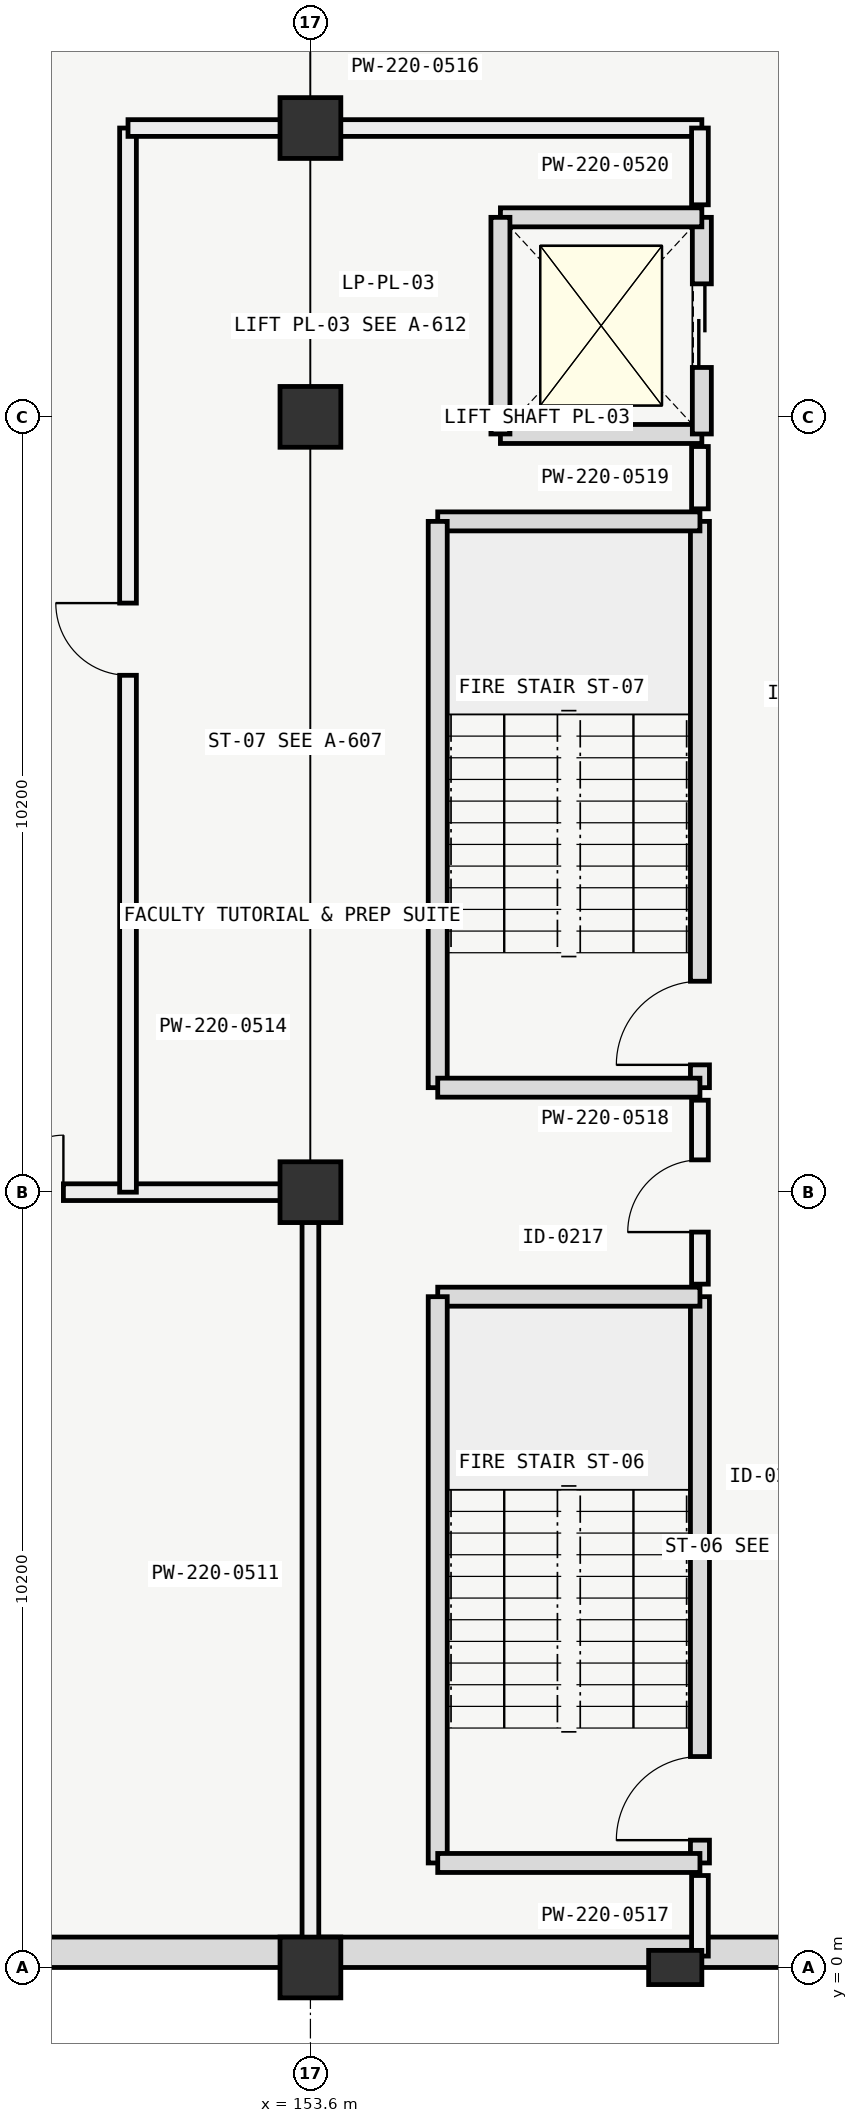
"""IFC4 building model, lengths in metres.
Left out: names, types, materials, properties, quantities, classifications, styles, units other than length and angle.
Written with IfcOpenShell. Run it as: python <this file> out.ifc"""

import sys

from ifc_helpers import new_model, si_unit, direction, frame, frame_2d, origin, origin_2d, place, context, subcontext, project, spatial, rectangle, extrude, element, fill, save


model = new_model("IFC4")
c1 = context("Model", 3, precision=1e-05, world=origin(), true_north=direction((0.0, 1.0)))
c2 = subcontext(c1, "Body", "Model", "MODEL_VIEW")
j1 = project(units=[si_unit("LENGTHUNIT", "METRE"), si_unit("PLANEANGLEUNIT", "RADIAN")], contexts=[c1])
p1 = place(None, origin())
s1 = spatial("IfcSite", under=j1, at=p1, CompositionType="ELEMENT")
p2 = place(p1, origin())
s2 = spatial("IfcBuilding", under=s1, at=p2, CompositionType="ELEMENT")
p3 = place(p2, frame((0.0, 0.0, -4.2)))
s3 = spatial("IfcBuildingStorey", under=s2, at=p3, CompositionType="ELEMENT", Elevation=-4.2)
for number, where, z_axis, x_axis in (
    (1, (153.6, 0.0, 0.0), (0.0, 0.0, 1.0), (1.0, 0.0, 0.0)),
    (2, (153.6, 10.2, 0.0), (0.0, 0.0, 1.0), (1.0, 0.0, 0.0)),
    (3, (153.6, 20.4, 0.0), (0.0, 0.0, 1.0), (1.0, 0.0, 0.0)),
    (4, (153.6, 24.2, 0.0), (0.0, 0.0, 1.0), (1.0, 0.0, 0.0)),
):
    element("IfcColumn", number, at=place(p3, frame(where, z_axis=z_axis, x_axis=x_axis)), inside=s3, PredefinedType="COLUMN", context=c2, shape_type="SweptSolid", body=[
        extrude(rectangle(XDim=0.8, YDim=0.8, at=origin_2d()), origin(), (0.0, 0.0, 1.0), 4.2),
    ])
p4 = place(p3, frame((158.4, 0.0, 0.0), z_axis=(0.0, 0.0, 1.0), x_axis=(0.0, 1.0, 0.0)))
e5 = element("IfcColumn", 5, at=p4, inside=s3, PredefinedType="PILASTER", context=c2, shape_type="SweptSolid", body=[
    extrude(rectangle(XDim=0.45, YDim=0.7, at=origin_2d()), origin(), (0.0, 0.0, 1.0), 4.2),
])
p5 = place(p3, frame((134.6, 0.2, 0.0), z_axis=(0.0, 0.0, 1.0), x_axis=(1.0, 0.0, 0.0)))
e6 = element("IfcWall", 6, at=p5, inside=s3, PredefinedType="USERDEFINED", context=c2, shape_type="SweptSolid", body=[
    extrude(rectangle(XDim=38.0, YDim=0.4, at=frame_2d((19.0, 0.0))), origin(), (0.0, 0.0, 1.0), 3.9),
])
p6 = place(p3, frame((158.725, 1.375, 0.0), z_axis=(0.0, 0.0, 1.0), x_axis=(0.0, 1.0, 0.0)))
e7 = element("IfcWall", 7, at=p6, inside=s3, PredefinedType="SOLIDWALL", context=c2, shape_type="SweptSolid", body=[
    extrude(rectangle(XDim=7.45, YDim=0.25, at=frame_2d((3.725, 0.0))), origin(), (0.0, 0.0, 1.0), 3.9),
])
p7 = place(p6, frame((0.3, 0.0, 0.0)))
e8 = element("IfcOpeningElement", 8, at=p7, cuts=e7, PredefinedType="OPENING", context=c2, shape_type="SweptSolid", body=[
    extrude(rectangle(XDim=1.1, YDim=2.2, at=frame_2d((0.55, 1.1))), frame((0.0, 0.135, 0.0), z_axis=(0.0, -1.0, 0.0), x_axis=(1.0, 0.0, 0.0)), (0.0, 0.0, 1.0), 0.27),
])
p8 = place(p3, frame((158.725, 8.825, 0.0), z_axis=(0.0, 0.0, 1.0), x_axis=(-1.0, 0.0, 0.0)))
e9 = element("IfcWall", 9, at=p8, inside=s3, PredefinedType="SOLIDWALL", context=c2, shape_type="SweptSolid", body=[
    extrude(rectangle(XDim=3.45, YDim=0.25, at=frame_2d((1.725, 0.0))), origin(), (0.0, 0.0, 1.0), 3.9),
])
p9 = place(p3, frame((155.275, 8.825, 0.0), z_axis=(0.0, 0.0, 1.0), x_axis=(0.0, -1.0, 0.0)))
e10 = element("IfcWall", 10, at=p9, inside=s3, PredefinedType="SOLIDWALL", context=c2, shape_type="SweptSolid", body=[
    extrude(rectangle(XDim=7.45, YDim=0.25, at=frame_2d((3.725, 0.0))), origin(), (0.0, 0.0, 1.0), 3.9),
])
p10 = place(p3, frame((155.275, 1.375, 0.0), z_axis=(0.0, 0.0, 1.0), x_axis=(1.0, 0.0, 0.0)))
e11 = element("IfcWall", 11, at=p10, inside=s3, PredefinedType="SOLIDWALL", context=c2, shape_type="SweptSolid", body=[
    extrude(rectangle(XDim=3.45, YDim=0.25, at=frame_2d((1.725, 0.0))), origin(), (0.0, 0.0, 1.0), 3.9),
])
p11 = place(p3, frame((158.725, 11.575, 0.0), z_axis=(0.0, 0.0, 1.0), x_axis=(0.0, 1.0, 0.0)))
e12 = element("IfcWall", 12, at=p11, inside=s3, PredefinedType="SOLIDWALL", context=c2, shape_type="SweptSolid", body=[
    extrude(rectangle(XDim=7.45, YDim=0.25, at=frame_2d((3.725, 0.0))), origin(), (0.0, 0.0, 1.0), 3.9),
])
p12 = place(p11, frame((0.3, 0.0, 0.0)))
e13 = element("IfcOpeningElement", 13, at=p12, cuts=e12, PredefinedType="OPENING", context=c2, shape_type="SweptSolid", body=[
    extrude(rectangle(XDim=1.1, YDim=2.2, at=frame_2d((0.55, 1.1))), frame((0.0, 0.135, 0.0), z_axis=(0.0, -1.0, 0.0), x_axis=(1.0, 0.0, 0.0)), (0.0, 0.0, 1.0), 0.27),
])
p13 = place(p3, frame((158.725, 19.025, 0.0), z_axis=(0.0, 0.0, 1.0), x_axis=(-1.0, 0.0, 0.0)))
e14 = element("IfcWall", 14, at=p13, inside=s3, PredefinedType="SOLIDWALL", context=c2, shape_type="SweptSolid", body=[
    extrude(rectangle(XDim=3.45, YDim=0.25, at=frame_2d((1.725, 0.0))), origin(), (0.0, 0.0, 1.0), 3.9),
])
p14 = place(p3, frame((155.275, 19.025, 0.0), z_axis=(0.0, 0.0, 1.0), x_axis=(0.0, -1.0, 0.0)))
e15 = element("IfcWall", 15, at=p14, inside=s3, PredefinedType="SOLIDWALL", context=c2, shape_type="SweptSolid", body=[
    extrude(rectangle(XDim=7.45, YDim=0.25, at=frame_2d((3.725, 0.0))), origin(), (0.0, 0.0, 1.0), 3.9),
])
p15 = place(p3, frame((155.275, 11.575, 0.0), z_axis=(0.0, 0.0, 1.0), x_axis=(1.0, 0.0, 0.0)))
e16 = element("IfcWall", 16, at=p15, inside=s3, PredefinedType="SOLIDWALL", context=c2, shape_type="SweptSolid", body=[
    extrude(rectangle(XDim=3.45, YDim=0.25, at=frame_2d((1.725, 0.0))), origin(), (0.0, 0.0, 1.0), 3.9),
])
p16 = place(p3, frame((156.1, 20.175, -0.15), z_axis=(0.0, 0.0, 1.0), x_axis=(1.0, 0.0, 0.0)))
e17 = element("IfcWall", 17, at=p16, inside=s3, PredefinedType="SOLIDWALL", context=c2, shape_type="SweptSolid", body=[
    extrude(rectangle(XDim=2.65, YDim=0.25, at=frame_2d((1.325, 0.0))), origin(), (0.0, 0.0, 1.0), 4.05),
])
p17 = place(p3, frame((158.75, 20.175, -0.15), z_axis=(0.0, 0.0, 1.0), x_axis=(0.0, 1.0, 0.0)))
e18 = element("IfcWall", 18, at=p17, inside=s3, PredefinedType="SOLIDWALL", context=c2, shape_type="SweptSolid", body=[
    extrude(rectangle(XDim=2.85, YDim=0.25, at=frame_2d((1.425, 0.0))), origin(), (0.0, 0.0, 1.0), 4.05),
])
p18 = place(p17, frame((0.875, 0.0, 0.15)))
e19 = element("IfcOpeningElement", 19, at=p18, cuts=e18, PredefinedType="OPENING", context=c2, shape_type="SweptSolid", body=[
    extrude(rectangle(XDim=1.1, YDim=2.1, at=frame_2d((0.55, 1.05))), frame((0.0, 0.135, 0.0), z_axis=(0.0, -1.0, 0.0), x_axis=(1.0, 0.0, 0.0)), (0.0, 0.0, 1.0), 0.27),
])
p19 = place(p3, frame((158.75, 23.025, -0.15), z_axis=(0.0, 0.0, 1.0), x_axis=(-1.0, 0.0, 0.0)))
e20 = element("IfcWall", 20, at=p19, inside=s3, PredefinedType="SOLIDWALL", context=c2, shape_type="SweptSolid", body=[
    extrude(rectangle(XDim=2.65, YDim=0.25, at=frame_2d((1.325, 0.0))), origin(), (0.0, 0.0, 1.0), 4.05),
])
p20 = place(p3, frame((156.1, 23.025, -0.15), z_axis=(0.0, 0.0, 1.0), x_axis=(0.0, -1.0, 0.0)))
e21 = element("IfcWall", 21, at=p20, inside=s3, PredefinedType="SOLIDWALL", context=c2, shape_type="SweptSolid", body=[
    extrude(rectangle(XDim=2.85, YDim=0.25, at=frame_2d((1.425, 0.0))), origin(), (0.0, 0.0, 1.0), 4.05),
])
p21 = place(p3, frame((134.55, 10.2, 0.0), z_axis=(0.0, 0.0, 1.0), x_axis=(1.0, 0.0, 0.0)))
e22 = element("IfcWall", 22, at=p21, inside=s3, PredefinedType="PARTITIONING", context=c2, shape_type="SweptSolid", body=[
    extrude(rectangle(XDim=19.05, YDim=0.22, at=frame_2d((9.525, 0.0))), origin(), (0.0, 0.0, 1.0), 3.18),
])
p22 = place(p21, frame((14.3, 0.0, 0.0)))
e23 = element("IfcOpeningElement", 23, at=p22, cuts=e22, PredefinedType="OPENING", context=c2, shape_type="SweptSolid", body=[
    extrude(rectangle(XDim=1.5, YDim=2.2, at=frame_2d((0.75, 1.1))), frame((0.0, 0.12, 0.0), z_axis=(0.0, -1.0, 0.0), x_axis=(1.0, 0.0, 0.0)), (0.0, 0.0, 1.0), 0.24),
])
p23 = place(p3, frame((153.6, 0.15, 0.0), z_axis=(0.0, 0.0, 1.0), x_axis=(0.0, 1.0, 0.0)))
e24 = element("IfcWall", 24, at=p23, inside=s3, PredefinedType="PARTITIONING", context=c2, shape_type="SweptSolid", body=[
    extrude(rectangle(XDim=10.05, YDim=0.22, at=frame_2d((5.025, 0.0))), origin(), (0.0, 0.0, 1.0), 3.18),
])
p24 = place(p3, frame((151.2, 10.2, 0.0), z_axis=(0.0, 0.0, 1.0), x_axis=(0.0, 1.0, 0.0)))
e25 = element("IfcWall", 25, at=p24, inside=s3, PredefinedType="PARTITIONING", context=c2, shape_type="SweptSolid", body=[
    extrude(rectangle(XDim=14.0, YDim=0.22, at=frame_2d((7.0, 0.0))), origin(), (0.0, 0.0, 1.0), 3.18),
])
p25 = place(p24, frame((6.8, 0.0, 0.0)))
e26 = element("IfcOpeningElement", 26, at=p25, cuts=e25, PredefinedType="OPENING", context=c2, shape_type="SweptSolid", body=[
    extrude(rectangle(XDim=0.95, YDim=2.1, at=frame_2d((0.475, 1.05))), frame((0.0, 0.12, 0.0), z_axis=(0.0, -1.0, 0.0), x_axis=(1.0, 0.0, 0.0)), (0.0, 0.0, 1.0), 0.24),
])
p26 = place(p3, frame((151.2, 24.2, 0.0), z_axis=(0.0, 0.0, 1.0), x_axis=(1.0, 0.0, 0.0)))
e27 = element("IfcWall", 27, at=p26, inside=s3, PredefinedType="PARTITIONING", context=c2, shape_type="SweptSolid", body=[
    extrude(rectangle(XDim=7.55, YDim=0.22, at=frame_2d((3.775, 0.0))), origin(), (0.0, 0.0, 1.0), 3.23),
])
p27 = place(p3, frame((158.725, 0.15, 0.0), z_axis=(0.0, 0.0, 1.0), x_axis=(0.0, 1.0, 0.0)))
e28 = element("IfcWall", 28, at=p27, inside=s3, PredefinedType="PARTITIONING", context=c2, shape_type="SweptSolid", body=[
    extrude(rectangle(XDim=1.06, YDim=0.22, at=frame_2d((0.53, 0.0))), origin(), (0.0, 0.0, 1.0), 3.23),
])
p28 = place(p3, frame((158.725, 8.99, 0.0), z_axis=(0.0, 0.0, 1.0), x_axis=(0.0, 1.0, 0.0)))
e29 = element("IfcWall", 29, at=p28, inside=s3, PredefinedType="PARTITIONING", context=c2, shape_type="SweptSolid", body=[
    extrude(rectangle(XDim=2.42, YDim=0.22, at=frame_2d((1.21, 0.0))), origin(), (0.0, 0.0, 1.0), 3.18),
])
p29 = place(p28, frame((0.685, 0.0, 0.0)))
e30 = element("IfcOpeningElement", 30, at=p29, cuts=e29, PredefinedType="OPENING", context=c2, shape_type="SweptSolid", body=[
    extrude(rectangle(XDim=0.95, YDim=2.1, at=frame_2d((0.475, 1.05))), frame((0.0, 0.12, 0.0), z_axis=(0.0, -1.0, 0.0), x_axis=(1.0, 0.0, 0.0)), (0.0, 0.0, 1.0), 0.24),
])
p30 = place(p3, frame((158.725, 19.19, 0.0), z_axis=(0.0, 0.0, 1.0), x_axis=(0.0, 1.0, 0.0)))
e31 = element("IfcWall", 31, at=p30, inside=s3, PredefinedType="PARTITIONING", context=c2, shape_type="SweptSolid", body=[
    extrude(rectangle(XDim=0.82, YDim=0.22, at=frame_2d((0.41, 0.0))), origin(), (0.0, 0.0, 1.0), 3.85),
])
p31 = place(p3, frame((158.725, 23.19, 0.0), z_axis=(0.0, 0.0, 1.0), x_axis=(0.0, 1.0, 0.0)))
e32 = element("IfcWall", 32, at=p31, inside=s3, PredefinedType="PARTITIONING", context=c2, shape_type="SweptSolid", body=[
    extrude(rectangle(XDim=1.01, YDim=0.22, at=frame_2d((0.505, 0.0))), origin(), (0.0, 0.0, 1.0), 3.85),
])
p32 = place(p7, origin())
e33 = element("IfcDoor", 33, at=p32, inside=s3, OperationType="SINGLE_SWING_LEFT", PredefinedType="DOOR", context=c2, shape_type="SweptSolid", body=[
    extrude(rectangle(XDim=1.1, YDim=2.2, at=frame_2d((0.55, 1.1))), frame((0.0, 0.025, 0.0), z_axis=(0.0, -1.0, 0.0), x_axis=(1.0, 0.0, 0.0)), (0.0, 0.0, 1.0), 0.05),
])
fill(e8, e33)
p33 = place(p12, origin())
e34 = element("IfcDoor", 34, at=p33, inside=s3, OperationType="SINGLE_SWING_LEFT", PredefinedType="DOOR", context=c2, shape_type="SweptSolid", body=[
    extrude(rectangle(XDim=1.1, YDim=2.2, at=frame_2d((0.55, 1.1))), frame((0.0, 0.025, 0.0), z_axis=(0.0, -1.0, 0.0), x_axis=(1.0, 0.0, 0.0)), (0.0, 0.0, 1.0), 0.05),
])
fill(e13, e34)
p34 = place(p18, origin())
e35 = element("IfcDoor", 35, at=p34, inside=s3, OperationType="SLIDING_TO_LEFT", PredefinedType="DOOR", context=c2, shape_type="SweptSolid", body=[
    extrude(rectangle(XDim=1.1, YDim=2.1, at=frame_2d((0.55, 1.05))), frame((0.0, 0.025, 0.0), z_axis=(0.0, -1.0, 0.0), x_axis=(1.0, 0.0, 0.0)), (0.0, 0.0, 1.0), 0.05),
])
fill(e19, e35)
p35 = place(p22, origin())
e36 = element("IfcDoor", 36, at=p35, inside=s3, OperationType="DOUBLE_DOOR_SINGLE_SWING", PredefinedType="DOOR", context=c2, shape_type="SweptSolid", body=[
    extrude(rectangle(XDim=1.5, YDim=2.2, at=frame_2d((0.75, 1.1))), frame((0.0, 0.025, 0.0), z_axis=(0.0, -1.0, 0.0), x_axis=(1.0, 0.0, 0.0)), (0.0, 0.0, 1.0), 0.05),
])
fill(e23, e36)
p36 = place(p25, origin())
e37 = element("IfcDoor", 37, at=p36, inside=s3, OperationType="SINGLE_SWING_RIGHT", PredefinedType="DOOR", context=c2, shape_type="SweptSolid", body=[
    extrude(rectangle(XDim=0.95, YDim=2.1, at=frame_2d((0.475, 1.05))), frame((0.0, 0.025, 0.0), z_axis=(0.0, -1.0, 0.0), x_axis=(1.0, 0.0, 0.0)), (0.0, 0.0, 1.0), 0.05),
])
fill(e26, e37)
p37 = place(p29, origin())
e38 = element("IfcDoor", 38, at=p37, inside=s3, OperationType="SINGLE_SWING_LEFT", PredefinedType="DOOR", context=c2, shape_type="SweptSolid", body=[
    extrude(rectangle(XDim=0.95, YDim=2.1, at=frame_2d((0.475, 1.05))), frame((0.0, 0.025, 0.0), z_axis=(0.0, -1.0, 0.0), x_axis=(1.0, 0.0, 0.0)), (0.0, 0.0, 1.0), 0.05),
])
fill(e30, e38)
save(model, sys.argv[1])
